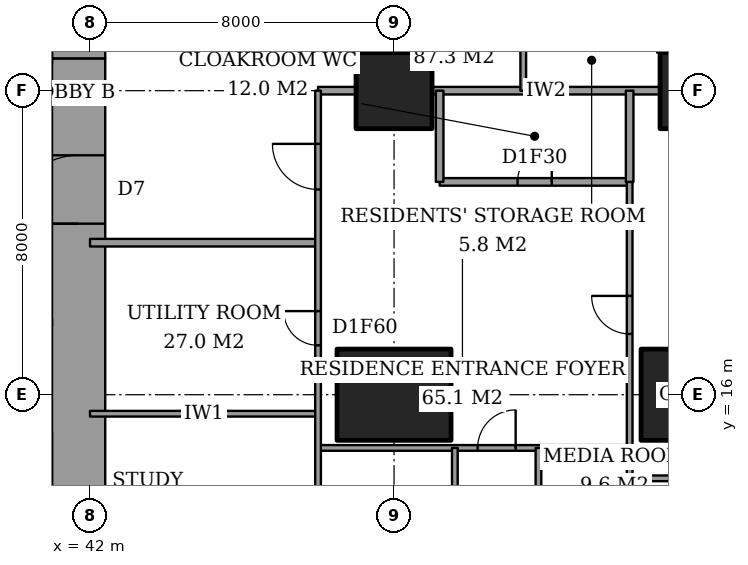
"""IFC4 building model, lengths in metres.
Left out: names, types, materials, properties, quantities, classifications, styles, units other than length and angle.
Written with IfcOpenShell. Run it as: python <this file> out.ifc"""

import sys

from ifc_helpers import new_model, si_unit, direction, frame, frame_2d, origin, origin_2d, place, context, subcontext, project, spatial, rectangle, extrude, element, fill, save


model = new_model("IFC4")
c1 = context("Model", 3, precision=1e-05, world=origin(), true_north=direction((0.0, 1.0)))
c2 = subcontext(c1, "Body", "Model", "MODEL_VIEW")
j1 = project(units=[si_unit("LENGTHUNIT", "METRE"), si_unit("PLANEANGLEUNIT", "RADIAN")], contexts=[c1])
p1 = place(None, origin())
s1 = spatial("IfcSite", under=j1, at=p1, CompositionType="ELEMENT")
p2 = place(p1, origin())
s2 = spatial("IfcBuilding", under=s1, at=p2, CompositionType="ELEMENT")
p3 = place(p2, frame((0.0, 0.0, 44.0)))
s3 = spatial("IfcBuildingStorey", under=s2, at=p3, CompositionType="ELEMENT", Elevation=44.0)
p4 = place(p3, frame((50.0, 16.0, 0.0), z_axis=(0.0, 0.0, 1.0), x_axis=(1.0, 0.0, 0.0)))
e1 = element("IfcColumn", 1, at=p4, inside=s3, PredefinedType="COLUMN", context=c2, shape_type="SweptSolid", body=[
    extrude(rectangle(XDim=3.0, YDim=2.4, at=origin_2d()), origin(), (0.0, 0.0, 1.0), 3.6),
])
p5 = place(p3, frame((50.0, 24.0, 0.0), z_axis=(0.0, 0.0, 1.0), x_axis=(1.0, 0.0, 0.0)))
e2 = element("IfcColumn", 2, at=p5, inside=s3, PredefinedType="COLUMN", context=c2, shape_type="SweptSolid", body=[
    extrude(rectangle(XDim=2.0, YDim=2.0, at=origin_2d()), origin(), (0.0, 0.0, 1.0), 3.6),
])
p6 = place(p3, frame((58.0, 16.0, 0.0), z_axis=(0.0, 0.0, 1.0), x_axis=(1.0, 0.0, 0.0)))
e3 = element("IfcColumn", 3, at=p6, inside=s3, PredefinedType="COLUMN", context=c2, shape_type="SweptSolid", body=[
    extrude(rectangle(XDim=3.0, YDim=2.4, at=origin_2d()), origin(), (0.0, 0.0, 1.0), 3.6),
])
p7 = place(p3, frame((58.0, 24.0, 0.0), z_axis=(0.0, 0.0, 1.0), x_axis=(1.0, 0.0, 0.0)))
e4 = element("IfcColumn", 4, at=p7, inside=s3, PredefinedType="COLUMN", context=c2, shape_type="SweptSolid", body=[
    extrude(rectangle(XDim=2.0, YDim=2.0, at=origin_2d()), origin(), (0.0, 0.0, 1.0), 3.6),
])
p8 = place(p3, frame((41.7, 13.0, 0.0), z_axis=(0.0, 0.0, 1.0), x_axis=(0.0, 1.0, 0.0)))
e5 = element("IfcWall", 5, at=p8, inside=s3, PredefinedType="SHEAR", context=c2, shape_type="SweptSolid", body=[
    extrude(rectangle(XDim=11.85, YDim=1.4, at=frame_2d((5.925, 0.0))), origin(), (0.0, 0.0, 1.0), 3.6),
])
p9 = place(p8, frame((7.5, 0.0, 0.0)))
e6 = element("IfcOpeningElement", 6, at=p9, cuts=e5, PredefinedType="OPENING", context=c2, shape_type="SweptSolid", body=[
    extrude(rectangle(XDim=1.8, YDim=2.4, at=frame_2d((0.9, 1.2))), frame((0.0, 0.71, 0.0), z_axis=(0.0, -1.0, 0.0), x_axis=(1.0, 0.0, 0.0)), (0.0, 0.0, 1.0), 1.42),
])
p10 = place(p3, frame((41.7, 24.85, 0.0), z_axis=(0.0, 0.0, 1.0), x_axis=(0.0, 1.0, 0.0)))
e7 = element("IfcWall", 7, at=p10, inside=s3, PredefinedType="SHEAR", context=c2, shape_type="SweptSolid", body=[
    extrude(rectangle(XDim=10.15, YDim=1.4, at=frame_2d((5.075, 0.0))), origin(), (0.0, 0.0, 1.0), 3.6),
])
p11 = place(p3, frame((56.2, 13.8, 0.0), z_axis=(0.0, 0.0, 1.0), x_axis=(1.0, 0.0, 0.0)))
e8 = element("IfcWall", 8, at=p11, inside=s3, PredefinedType="PARTITIONING", context=c2, shape_type="SweptSolid", body=[
    extrude(rectangle(XDim=3.075, YDim=0.15, at=frame_2d((1.538, 0.0))), origin(), (0.0, 0.0, 1.0), 3.35),
])
p12 = place(p3, frame((48.0, 14.6, 0.0), z_axis=(0.0, 0.0, 1.0), x_axis=(1.0, 0.0, 0.0)))
e9 = element("IfcWall", 9, at=p12, inside=s3, PredefinedType="PARTITIONING", context=c2, shape_type="SweptSolid", body=[
    extrude(rectangle(XDim=8.2, YDim=0.15, at=frame_2d((4.1, 0.0))), origin(), (0.0, 0.0, 1.0), 3.35),
])
p13 = place(p12, frame((4.2, 0.0, 0.0)))
e10 = element("IfcOpeningElement", 10, at=p13, cuts=e9, PredefinedType="OPENING", context=c2, shape_type="SweptSolid", body=[
    extrude(rectangle(XDim=1.0, YDim=2.1, at=frame_2d((0.5, 1.05))), frame((0.0, 0.085, 0.0), z_axis=(0.0, -1.0, 0.0), x_axis=(1.0, 0.0, 0.0)), (0.0, 0.0, 1.0), 0.17),
])
p14 = place(p3, frame((42.0, 15.5, 0.0), z_axis=(0.0, 0.0, 1.0), x_axis=(1.0, 0.0, 0.0)))
e11 = element("IfcWall", 11, at=p14, inside=s3, PredefinedType="PARTITIONING", context=c2, shape_type="SweptSolid", body=[
    extrude(rectangle(XDim=6.0, YDim=0.15, at=frame_2d((3.0, 0.0))), origin(), (0.0, 0.0, 1.0), 3.35),
])
p15 = place(p3, frame((42.0, 20.0, 0.0), z_axis=(0.0, 0.0, 1.0), x_axis=(1.0, 0.0, 0.0)))
e12 = element("IfcWall", 12, at=p15, inside=s3, PredefinedType="PARTITIONING", context=c2, shape_type="SweptSolid", body=[
    extrude(rectangle(XDim=6.0, YDim=0.2, at=frame_2d((3.0, 0.0))), origin(), (0.0, 0.0, 1.0), 3.35),
])
p16 = place(p3, frame((51.2, 21.6, 0.0), z_axis=(0.0, 0.0, 1.0), x_axis=(1.0, 0.0, 0.0)))
e13 = element("IfcWall", 13, at=p16, inside=s3, PredefinedType="PARTITIONING", context=c2, shape_type="SweptSolid", body=[
    extrude(rectangle(XDim=5.0, YDim=0.2, at=frame_2d((2.5, 0.0))), origin(), (0.0, 0.0, 1.0), 3.35),
])
p17 = place(p16, frame((2.05, 0.0, 0.0)))
e14 = element("IfcOpeningElement", 14, at=p17, cuts=e13, PredefinedType="OPENING", context=c2, shape_type="SweptSolid", body=[
    extrude(rectangle(XDim=0.9, YDim=2.1, at=frame_2d((0.45, 1.05))), frame((0.0, 0.11, 0.0), z_axis=(0.0, -1.0, 0.0), x_axis=(1.0, 0.0, 0.0)), (0.0, 0.0, 1.0), 0.22),
])
p18 = place(p3, frame((48.0, 24.0, 0.0), z_axis=(0.0, 0.0, 1.0), x_axis=(1.0, 0.0, 0.0)))
e15 = element("IfcWall", 15, at=p18, inside=s3, PredefinedType="PARTITIONING", context=c2, shape_type="SweptSolid", body=[
    extrude(rectangle(XDim=1.0, YDim=0.2, at=frame_2d((0.5, 0.0))), origin(), (0.0, 0.0, 1.0), 3.35),
])
p19 = place(p3, frame((51.0, 24.0, 0.0), z_axis=(0.0, 0.0, 1.0), x_axis=(1.0, 0.0, 0.0)))
e16 = element("IfcWall", 16, at=p19, inside=s3, PredefinedType="PARTITIONING", context=c2, shape_type="SweptSolid", body=[
    extrude(rectangle(XDim=6.0, YDim=0.2, at=frame_2d((3.0, 0.0))), origin(), (0.0, 0.0, 1.0), 3.35),
])
p20 = place(p3, frame((48.0, 10.6, 0.0), z_axis=(0.0, 0.0, 1.0), x_axis=(0.0, 1.0, 0.0)))
e17 = element("IfcWall", 17, at=p20, inside=s3, PredefinedType="PARTITIONING", context=c2, shape_type="SweptSolid", body=[
    extrude(rectangle(XDim=13.4, YDim=0.15, at=frame_2d((6.7, 0.0))), origin(), (0.0, 0.0, 1.0), 3.35),
])
p21 = place(p20, frame((10.8, 0.0, 0.0)))
e18 = element("IfcOpeningElement", 18, at=p21, cuts=e17, PredefinedType="OPENING", context=c2, shape_type="SweptSolid", body=[
    extrude(rectangle(XDim=1.2, YDim=2.4, at=frame_2d((0.6, 1.2))), frame((0.0, 0.085, 0.0), z_axis=(0.0, -1.0, 0.0), x_axis=(1.0, 0.0, 0.0)), (0.0, 0.0, 1.0), 0.17),
])
p22 = place(p20, frame((6.7, 0.0, 0.0)))
e19 = element("IfcOpeningElement", 19, at=p22, cuts=e17, PredefinedType="OPENING", context=c2, shape_type="SweptSolid", body=[
    extrude(rectangle(XDim=0.9, YDim=2.1, at=frame_2d((0.45, 1.05))), frame((0.0, 0.085, 0.0), z_axis=(0.0, -1.0, 0.0), x_axis=(1.0, 0.0, 0.0)), (0.0, 0.0, 1.0), 0.17),
])
p23 = place(p3, frame((51.2, 21.6, 0.0), z_axis=(0.0, 0.0, 1.0), x_axis=(0.0, 1.0, 0.0)))
e20 = element("IfcWall", 20, at=p23, inside=s3, PredefinedType="PARTITIONING", context=c2, shape_type="SweptSolid", body=[
    extrude(rectangle(XDim=2.4, YDim=0.2, at=frame_2d((1.2, 0.0))), origin(), (0.0, 0.0, 1.0), 3.35),
])
p24 = place(p3, frame((51.6, 10.6, 0.0), z_axis=(0.0, 0.0, 1.0), x_axis=(0.0, 1.0, 0.0)))
e21 = element("IfcWall", 21, at=p24, inside=s3, PredefinedType="PARTITIONING", context=c2, shape_type="SweptSolid", body=[
    extrude(rectangle(XDim=4.0, YDim=0.15, at=frame_2d((2.0, 0.0))), origin(), (0.0, 0.0, 1.0), 3.35),
])
p25 = place(p3, frame((53.4, 24.0, 0.0), z_axis=(0.0, 0.0, 1.0), x_axis=(0.0, 1.0, 0.0)))
e22 = element("IfcWall", 22, at=p25, inside=s3, PredefinedType="PARTITIONING", context=c2, shape_type="SweptSolid", body=[
    extrude(rectangle(XDim=1.6, YDim=0.15, at=frame_2d((0.8, 0.0))), origin(), (0.0, 0.0, 1.0), 3.35),
])
p26 = place(p3, frame((53.8, 10.6, 0.0), z_axis=(0.0, 0.0, 1.0), x_axis=(0.0, 1.0, 0.0)))
e23 = element("IfcWall", 23, at=p26, inside=s3, PredefinedType="PARTITIONING", context=c2, shape_type="SweptSolid", body=[
    extrude(rectangle(XDim=4.0, YDim=0.15, at=frame_2d((2.0, 0.0))), origin(), (0.0, 0.0, 1.0), 3.35),
])
p27 = place(p3, frame((56.2, 21.6, 0.0), z_axis=(0.0, 0.0, 1.0), x_axis=(0.0, 1.0, 0.0)))
e24 = element("IfcWall", 24, at=p27, inside=s3, PredefinedType="PARTITIONING", context=c2, shape_type="SweptSolid", body=[
    extrude(rectangle(XDim=2.4, YDim=0.2, at=frame_2d((1.2, 0.0))), origin(), (0.0, 0.0, 1.0), 3.35),
])
p28 = place(p3, frame((56.2, 10.6, 0.0), z_axis=(0.0, 0.0, 1.0), x_axis=(0.0, 1.0, 0.0)))
e25 = element("IfcWall", 25, at=p28, inside=s3, PredefinedType="PARTITIONING", context=c2, shape_type="SweptSolid", body=[
    extrude(rectangle(XDim=11.0, YDim=0.15, at=frame_2d((5.5, 0.0))), origin(), (0.0, 0.0, 1.0), 3.35),
])
p29 = place(p28, frame((7.0, 0.0, 0.0)))
e26 = element("IfcOpeningElement", 26, at=p29, cuts=e25, PredefinedType="OPENING", context=c2, shape_type="SweptSolid", body=[
    extrude(rectangle(XDim=1.0, YDim=2.1, at=frame_2d((0.5, 1.05))), frame((0.0, 0.085, 0.0), z_axis=(0.0, -1.0, 0.0), x_axis=(1.0, 0.0, 0.0)), (0.0, 0.0, 1.0), 0.17),
])
p30 = place(p3, frame((28.3, 17.9, 0.0), z_axis=(0.0, 0.0, 1.0), x_axis=(1.0, 0.0, 0.0)))
e27 = element("IfcWall", 27, at=p30, inside=s3, PredefinedType="PARTITIONING", context=c2, shape_type="SweptSolid", body=[
    extrude(rectangle(XDim=12.7, YDim=0.2, at=frame_2d((6.35, 0.0))), origin(), (0.0, 0.0, 1.0), 3.6),
])
p31 = place(p30, frame((0.95, 0.0, 0.0)))
e28 = element("IfcOpeningElement", 28, at=p31, cuts=e27, PredefinedType="OPENING", context=c2, shape_type="SweptSolid", body=[
    extrude(rectangle(XDim=1.1, YDim=2.1, at=frame_2d((0.55, 1.05))), frame((0.0, 0.11, 0.0), z_axis=(0.0, -1.0, 0.0), x_axis=(1.0, 0.0, 0.0)), (0.0, 0.0, 1.0), 0.22),
])
p32 = place(p30, frame((4.15, 0.0, 0.0)))
e29 = element("IfcOpeningElement", 29, at=p32, cuts=e27, PredefinedType="OPENING", context=c2, shape_type="SweptSolid", body=[
    extrude(rectangle(XDim=1.1, YDim=2.1, at=frame_2d((0.55, 1.05))), frame((0.0, 0.11, 0.0), z_axis=(0.0, -1.0, 0.0), x_axis=(1.0, 0.0, 0.0)), (0.0, 0.0, 1.0), 0.22),
])
p33 = place(p30, frame((7.35, 0.0, 0.0)))
e30 = element("IfcOpeningElement", 30, at=p33, cuts=e27, PredefinedType="OPENING", context=c2, shape_type="SweptSolid", body=[
    extrude(rectangle(XDim=1.1, YDim=2.1, at=frame_2d((0.55, 1.05))), frame((0.0, 0.11, 0.0), z_axis=(0.0, -1.0, 0.0), x_axis=(1.0, 0.0, 0.0)), (0.0, 0.0, 1.0), 0.22),
])
p34 = place(p30, frame((10.6, 0.0, 0.0)))
e31 = element("IfcOpeningElement", 31, at=p34, cuts=e27, PredefinedType="OPENING", context=c2, shape_type="SweptSolid", body=[
    extrude(rectangle(XDim=1.2, YDim=2.1, at=frame_2d((0.6, 1.05))), frame((0.0, 0.11, 0.0), z_axis=(0.0, -1.0, 0.0), x_axis=(1.0, 0.0, 0.0)), (0.0, 0.0, 1.0), 0.22),
])
p35 = place(p29, origin())
e32 = element("IfcDoor", 32, at=p35, inside=s3, OperationType="SINGLE_SWING_LEFT", PredefinedType="DOOR", context=c2, shape_type="SweptSolid", body=[
    extrude(rectangle(XDim=1.0, YDim=2.1, at=frame_2d((0.5, 1.05))), frame((0.0, 0.025, 0.0), z_axis=(0.0, -1.0, 0.0), x_axis=(1.0, 0.0, 0.0)), (0.0, 0.0, 1.0), 0.05),
])
fill(e26, e32)
p36 = place(p17, origin())
e33 = element("IfcDoor", 33, at=p36, inside=s3, OperationType="SINGLE_SWING_LEFT", PredefinedType="DOOR", context=c2, shape_type="SweptSolid", body=[
    extrude(rectangle(XDim=0.9, YDim=2.1, at=frame_2d((0.45, 1.05))), frame((0.0, 0.025, 0.0), z_axis=(0.0, -1.0, 0.0), x_axis=(1.0, 0.0, 0.0)), (0.0, 0.0, 1.0), 0.05),
])
fill(e14, e33)
p37 = place(p21, origin())
e34 = element("IfcDoor", 34, at=p37, inside=s3, OperationType="SINGLE_SWING_LEFT", PredefinedType="DOOR", context=c2, shape_type="SweptSolid", body=[
    extrude(rectangle(XDim=1.2, YDim=2.4, at=frame_2d((0.6, 1.2))), frame((0.0, 0.025, 0.0), z_axis=(0.0, -1.0, 0.0), x_axis=(1.0, 0.0, 0.0)), (0.0, 0.0, 1.0), 0.05),
])
fill(e18, e34)
p38 = place(p13, origin())
e35 = element("IfcDoor", 35, at=p38, inside=s3, OperationType="SINGLE_SWING_LEFT", PredefinedType="DOOR", context=c2, shape_type="SweptSolid", body=[
    extrude(rectangle(XDim=1.0, YDim=2.1, at=frame_2d((0.5, 1.05))), frame((0.0, 0.025, 0.0), z_axis=(0.0, -1.0, 0.0), x_axis=(1.0, 0.0, 0.0)), (0.0, 0.0, 1.0), 0.05),
])
fill(e10, e35)
p39 = place(p22, origin())
e36 = element("IfcDoor", 36, at=p39, inside=s3, OperationType="SINGLE_SWING_LEFT", PredefinedType="DOOR", context=c2, shape_type="SweptSolid", body=[
    extrude(rectangle(XDim=0.9, YDim=2.1, at=frame_2d((0.45, 1.05))), frame((0.0, 0.025, 0.0), z_axis=(0.0, -1.0, 0.0), x_axis=(1.0, 0.0, 0.0)), (0.0, 0.0, 1.0), 0.05),
])
fill(e19, e36)
p40 = place(p9, origin())
e37 = element("IfcDoor", 37, at=p40, inside=s3, OperationType="DOUBLE_DOOR_DOUBLE_SWING", PredefinedType="DOOR", context=c2, shape_type="SweptSolid", body=[
    extrude(rectangle(XDim=1.8, YDim=2.4, at=frame_2d((0.9, 1.2))), frame((0.0, 0.025, 0.0), z_axis=(0.0, -1.0, 0.0), x_axis=(1.0, 0.0, 0.0)), (0.0, 0.0, 1.0), 0.05),
])
fill(e6, e37)
save(model, sys.argv[1])
